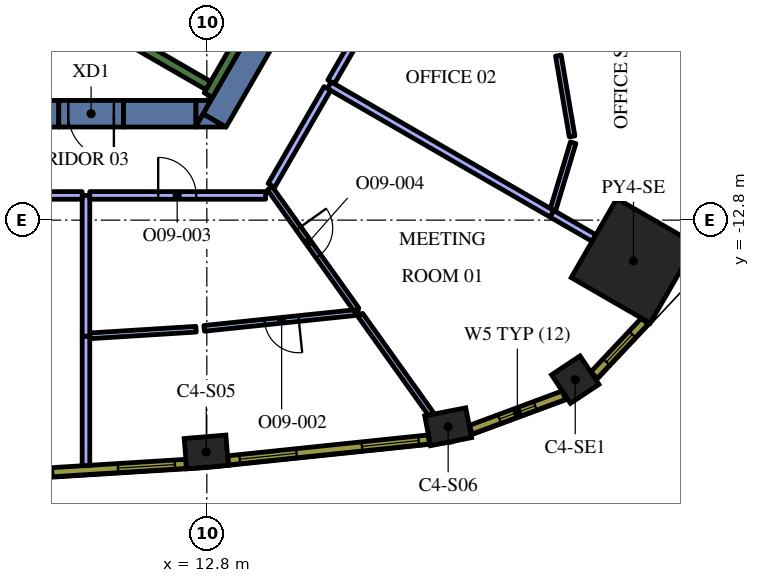
"""IFC4 building model, lengths in metres.
Left out: names, types, materials, properties, quantities, classifications, styles, units other than length and angle.
Written with IfcOpenShell. Run it as: python <this file> out.ifc"""

import sys

from ifc_helpers import new_model, si_unit, direction, frame, frame_2d, origin, origin_2d, place, context, subcontext, project, spatial, polyline, rectangle, outline, extrude, element, fill, save


model = new_model("IFC4")
c1 = context("Model", 3, precision=1e-05, world=origin(), true_north=direction((0.0, 1.0)))
c2 = subcontext(c1, "Body", "Model", "MODEL_VIEW")
j1 = project(units=[si_unit("LENGTHUNIT", "METRE"), si_unit("PLANEANGLEUNIT", "RADIAN")], contexts=[c1])
p1 = place(None, origin())
s1 = spatial("IfcSite", under=j1, at=p1, CompositionType="ELEMENT")
p2 = place(p1, origin())
s2 = spatial("IfcBuilding", under=s1, at=p2, CompositionType="ELEMENT")
p3 = place(p2, frame((0.0, 0.0, 239.4)))
s3 = spatial("IfcBuildingStorey", under=s2, at=p3, CompositionType="ELEMENT", Elevation=239.4)
p4 = place(p3, frame((24.027, -13.872, 0.0), z_axis=(0.0, 0.0, 1.0), x_axis=(0.866025403784, -0.5, 0.0)))
e1 = element("IfcColumn", 1, at=p4, inside=s3, PredefinedType="COLUMN", context=c2, shape_type="SweptSolid", body=[
    extrude(rectangle(XDim=2.4, YDim=2.4, at=origin_2d()), origin(), (0.0, 0.0, 1.0), 4.2),
])
for number, where, z_axis, x_axis in (
    (2, (12.785, -18.9, 0.0), (0.0, 0.0, 1.0), (0.997, 0.083, 0.0)),
    (3, (19.15, -18.237, 0.0), (0.0, 0.0, 1.0), (0.981, 0.192, 0.0)),
):
    element("IfcColumn", number, at=place(p3, frame(where, z_axis=z_axis, x_axis=x_axis)), inside=s3, PredefinedType="COLUMN", context=c2, shape_type="SweptSolid", body=[
        extrude(rectangle(XDim=1.1, YDim=0.8, at=origin_2d()), origin(), (0.0, 0.0, 1.0), 4.2),
    ])
p5 = place(p3, frame((22.494, -16.997, 0.0), z_axis=(0.0, 0.0, 1.0), x_axis=(0.833238868178, 0.552913183563, 0.0)))
e4 = element("IfcColumn", 4, at=p5, inside=s3, PredefinedType="COLUMN", context=c2, shape_type="SweptSolid", body=[
    extrude(rectangle(XDim=0.9, YDim=0.9, at=origin_2d()), origin(), (0.0, 0.0, 1.0), 4.2),
])
p6 = place(p3, frame((13.003, -10.179, 0.0), z_axis=(0.0, 0.0, 1.0), x_axis=(0.499972675833, 0.866041178825, 0.0)))
e5 = element("IfcWall", 5, at=p6, inside=s3, PredefinedType="SOLIDWALL", context=c2, shape_type="SweptSolid", body=[
    extrude(rectangle(XDim=3.829, YDim=0.7, at=frame_2d((1.915, 0.0))), origin(), (0.0, 0.0, 1.0), 4.2),
])
p7 = place(p3, origin())
e6 = element("IfcWall", 6, at=p7, inside=s3, PredefinedType="SOLIDWALL", context=c2, shape_type="SweptSolid", body=[
    extrude(outline(polyline([(12.5, -10.35), (12.698, -10.005), (13.296, -10.35), (12.5, -10.35)])), origin(), (0.0, 0.0, 1.0), 4.2),
])
p8 = place(p3, frame((10.604, -10.0, 0.0), z_axis=(0.0, 0.0, 1.0), x_axis=(1.0, 0.0, 0.0)))
e7 = element("IfcWall", 7, at=p8, inside=s3, PredefinedType="SOLIDWALL", context=c2, shape_type="SweptSolid", body=[
    extrude(rectangle(XDim=1.909, YDim=0.7, at=frame_2d((0.955, 0.0))), origin(), (0.0, 0.0, 1.0), 4.2),
])
e8 = element("IfcWall", 8, at=p7, inside=s3, PredefinedType="SOLIDWALL", context=c2, shape_type="SweptSolid", body=[
    extrude(outline(polyline([(12.904, -9.65), (12.516, -10.322), (12.516, -9.65), (12.904, -9.65)])), origin(), (0.0, 0.0, 1.0), 4.2),
])
p9 = place(p3, frame((8.904, -10.0, 0.0), z_axis=(0.0, 0.0, 1.0), x_axis=(-1.0, 0.0, 0.0)))
e9 = element("IfcWall", 9, at=p9, inside=s3, PredefinedType="SOLIDWALL", context=c2, shape_type="SweptSolid", body=[
    extrude(rectangle(XDim=22.226, YDim=0.7, at=frame_2d((11.113, 0.0))), origin(), (0.0, 0.0, 1.0), 4.2),
])
p10 = place(p3, frame((12.84, -9.511, 0.0), z_axis=(0.0, 0.0, 1.0), x_axis=(0.500048121057, 0.865997619297, 0.0)))
e10 = element("IfcWall", 10, at=p10, inside=s3, PredefinedType="SOLIDWALL", context=c2, shape_type="SweptSolid", body=[
    extrude(rectangle(XDim=3.634, YDim=0.25, at=frame_2d((1.817, 0.0))), origin(), (0.0, 0.0, 1.0), 4.2),
])
p11 = place(p3, frame((12.84, -9.261, 0.0), z_axis=(0.0, 0.0, 1.0), x_axis=(-0.866013990052, 0.500019768644, 0.0)))
e11 = element("IfcWall", 11, at=p11, inside=s3, PredefinedType="SOLIDWALL", context=c2, shape_type="SweptSolid", body=[
    extrude(rectangle(XDim=6.8, YDim=0.25, at=frame_2d((3.4, 0.0))), origin(), (0.0, 0.0, 1.0), 4.2),
])
p12 = place(p3, frame((10.604, -10.0, 0.0), z_axis=(0.0, 0.0, 1.0), x_axis=(-1.0, 0.0, 0.0)))
e12 = element("IfcWall", 12, at=p12, inside=s3, PredefinedType="SOLIDWALL", context=c2, shape_type="SweptSolid", body=[
    extrude(rectangle(XDim=1.7, YDim=0.7, at=frame_2d((0.85, 0.0))), origin(), (0.0, 0.0, 1.0), 4.2),
])
p13 = place(p12, frame((0.25, 0.0, 0.0)))
e13 = element("IfcOpeningElement", 13, at=p13, cuts=e12, PredefinedType="OPENING", context=c2, shape_type="SweptSolid", body=[
    extrude(rectangle(XDim=1.2, YDim=2.1, at=frame_2d((0.6, 1.05))), frame((0.0, 0.36, 0.0), z_axis=(0.0, -1.0, 0.0), x_axis=(1.0, 0.0, 0.0)), (0.0, 0.0, 1.0), 0.72),
])
p14 = place(p3, frame((9.62, -15.847, 0.0), z_axis=(0.0, 0.0, 1.0), x_axis=(0.0, -1.0, 0.0)))
e14 = element("IfcWall", 14, at=p14, inside=s3, PredefinedType="PARTITIONING", context=c2, shape_type="SweptSolid", body=[
    extrude(rectangle(XDim=3.411, YDim=0.2, at=frame_2d((1.705, 0.0))), origin(), (0.0, 0.0, 1.0), 3.45),
])
p15 = place(p3, frame((9.62, -12.15, 0.0), z_axis=(0.0, 0.0, 1.0), x_axis=(0.0, -1.0, 0.0)))
e15 = element("IfcWall", 15, at=p15, inside=s3, PredefinedType="PARTITIONING", context=c2, shape_type="SweptSolid", body=[
    extrude(rectangle(XDim=3.705, YDim=0.2, at=frame_2d((1.853, 0.0))), origin(), (0.0, 0.0, 1.0), 3.45),
])
p16 = place(p3, frame((7.03, -12.15, 0.0), z_axis=(0.0, 0.0, 1.0), x_axis=(1.0, 0.0, 0.0)))
e16 = element("IfcWall", 16, at=p16, inside=s3, PredefinedType="PARTITIONING", context=c2, shape_type="SweptSolid", body=[
    extrude(rectangle(XDim=2.49, YDim=0.2, at=frame_2d((1.245, 0.0))), origin(), (0.0, 0.0, 1.0), 3.45),
])
p17 = place(p3, frame((9.72, -15.844, 0.0), z_axis=(0.0, 0.0, 1.0), x_axis=(0.998063411199, 0.062204720286, 0.0)))
e17 = element("IfcWall", 17, at=p17, inside=s3, PredefinedType="PARTITIONING", context=c2, shape_type="SweptSolid", body=[
    extrude(rectangle(XDim=2.802, YDim=0.15, at=frame_2d((1.401, 0.0))), origin(), (0.0, 0.0, 1.0), 3.45),
])
p18 = place(p3, frame((16.788, -15.225, 0.0), z_axis=(0.0, 0.0, 1.0), x_axis=(-0.994622518406, -0.103566625322, 0.0)))
e18 = element("IfcWall", 18, at=p18, inside=s3, PredefinedType="PARTITIONING", context=c2, shape_type="SweptSolid", body=[
    extrude(rectangle(XDim=4.081, YDim=0.15, at=frame_2d((2.04, 0.0))), origin(), (0.0, 0.0, 1.0), 3.45),
])
p19 = place(p18, frame((1.581, 0.0, 0.0)))
e19 = element("IfcOpeningElement", 19, at=p19, cuts=e18, PredefinedType="OPENING", context=c2, shape_type="SweptSolid", body=[
    extrude(rectangle(XDim=0.9, YDim=2.1, at=frame_2d((0.45, 1.05))), frame((0.0, 0.085, 0.0), z_axis=(0.0, -1.0, 0.0), x_axis=(1.0, 0.0, 0.0)), (0.0, 0.0, 1.0), 0.17),
])
p20 = place(p3, frame((16.838, -15.295, 0.0), z_axis=(0.0, 0.0, 1.0), x_axis=(0.581015803238, -0.813892275666, 0.0)))
e20 = element("IfcWall", 20, at=p20, inside=s3, PredefinedType="PARTITIONING", context=c2, shape_type="SweptSolid", body=[
    extrude(rectangle(XDim=3.219, YDim=0.15, at=frame_2d((1.61, 0.0))), origin(), (0.0, 0.0, 1.0), 3.45),
])
p21 = place(p3, frame((14.457, -11.96, 0.0), z_axis=(0.0, 0.0, 1.0), x_axis=(0.581049944662, -0.81386790194, 0.0)))
e21 = element("IfcWall", 21, at=p21, inside=s3, PredefinedType="PARTITIONING", context=c2, shape_type="SweptSolid", body=[
    extrude(rectangle(XDim=3.926, YDim=0.15, at=frame_2d((1.963, 0.0))), origin(), (0.0, 0.0, 1.0), 3.45),
])
p22 = place(p21, frame((1.3, 0.0, 0.0)))
e22 = element("IfcOpeningElement", 22, at=p22, cuts=e21, PredefinedType="OPENING", context=c2, shape_type="SweptSolid", body=[
    extrude(rectangle(XDim=0.9, YDim=2.1, at=frame_2d((0.45, 1.05))), frame((0.0, 0.085, 0.0), z_axis=(0.0, -1.0, 0.0), x_axis=(1.0, 0.0, 0.0)), (0.0, 0.0, 1.0), 0.17),
])
p23 = place(p3, frame((9.72, -12.15, 0.0), z_axis=(0.0, 0.0, 1.0), x_axis=(1.0, 0.0, 0.0)))
e23 = element("IfcWall", 23, at=p23, inside=s3, PredefinedType="PARTITIONING", context=c2, shape_type="SweptSolid", body=[
    extrude(rectangle(XDim=4.627, YDim=0.2, at=frame_2d((2.314, 0.0))), origin(), (0.0, 0.0, 1.0), 3.45),
])
p24 = place(p23, frame((1.8, 0.0, 0.0)))
e24 = element("IfcOpeningElement", 24, at=p24, cuts=e23, PredefinedType="OPENING", context=c2, shape_type="SweptSolid", body=[
    extrude(rectangle(XDim=1.0, YDim=2.1, at=frame_2d((0.5, 1.05))), frame((0.0, 0.11, 0.0), z_axis=(0.0, -1.0, 0.0), x_axis=(1.0, 0.0, 0.0)), (0.0, 0.0, 1.0), 0.22),
])
p25 = place(p3, frame((21.873, -12.628, 0.0), z_axis=(0.0, 0.0, 1.0), x_axis=(0.866052988967, -0.499952218018, 0.0)))
e25 = element("IfcWall", 25, at=p25, inside=s3, PredefinedType="PARTITIONING", context=c2, shape_type="SweptSolid", body=[
    extrude(rectangle(XDim=1.288, YDim=0.2, at=frame_2d((0.644, 0.0))), origin(), (0.0, 0.0, 1.0), 3.45),
])
p26 = place(p3, frame((16.021, -9.25, 0.0), z_axis=(0.0, 0.0, 1.0), x_axis=(0.86602692059, -0.499997372806, 0.0)))
e26 = element("IfcWall", 26, at=p26, inside=s3, PredefinedType="PARTITIONING", context=c2, shape_type="SweptSolid", body=[
    extrude(rectangle(XDim=6.765, YDim=0.2, at=frame_2d((3.382, 0.0))), origin(), (0.0, 0.0, 1.0), 3.45),
])
p27 = place(p3, frame((14.498, -11.888, 0.0), z_axis=(0.0, 0.0, 1.0), x_axis=(0.500006981563, 0.86602137294, 0.0)))
e27 = element("IfcWall", 27, at=p27, inside=s3, PredefinedType="PARTITIONING", context=c2, shape_type="SweptSolid", body=[
    extrude(rectangle(XDim=2.946, YDim=0.2, at=frame_2d((1.473, 0.0))), origin(), (0.0, 0.0, 1.0), 3.45),
])
p28 = place(p3, frame((21.906, -12.532, 0.0), z_axis=(0.0, 0.0, 1.0), x_axis=(0.288789848591, 0.957392512688, 0.0)))
e28 = element("IfcWall", 28, at=p28, inside=s3, PredefinedType="PARTITIONING", context=c2, shape_type="SweptSolid", body=[
    extrude(rectangle(XDim=1.848, YDim=0.15, at=frame_2d((0.924, 0.0))), origin(), (0.0, 0.0, 1.0), 3.45),
])
p29 = place(p3, frame((22.412, -10.597, 0.0), z_axis=(0.0, 0.0, 1.0), x_axis=(-0.167612004459, 0.985853039738, 0.0)))
e29 = element("IfcWall", 29, at=p29, inside=s3, PredefinedType="PARTITIONING", context=c2, shape_type="SweptSolid", body=[
    extrude(rectangle(XDim=2.156, YDim=0.15, at=frame_2d((1.078, 0.0))), origin(), (0.0, 0.0, 1.0), 3.45),
])
p30 = place(p3, frame((16.072, -9.163, 0.0), z_axis=(0.0, 0.0, 1.0), x_axis=(0.500010870188, 0.866019127788, 0.0)))
e30 = element("IfcWall", 30, at=p30, inside=s3, PredefinedType="PARTITIONING", context=c2, shape_type="SweptSolid", body=[
    extrude(rectangle(XDim=3.249, YDim=0.2, at=frame_2d((1.624, 0.0))), origin(), (0.0, 0.0, 1.0), 3.45),
])
p31 = place(p3, frame((6.965, -19.543, 0.0), z_axis=(0.0, 0.0, 1.0), x_axis=(0.9980633213, 0.062206162685, 0.0)))
e31 = element("IfcWall", 31, at=p31, inside=s3, PredefinedType="SOLIDWALL", context=c2, shape_type="SweptSolid", body=[
    extrude(rectangle(XDim=5.298, YDim=0.24, at=frame_2d((2.649, 0.0))), origin(), (0.0, 0.0, 1.0), 3.95),
])
p32 = place(p31, frame((0.295, 0.0, 0.9)))
e32 = element("IfcOpeningElement", 32, at=p32, cuts=e31, PredefinedType="OPENING", context=c2, shape_type="SweptSolid", body=[
    extrude(rectangle(XDim=1.5, YDim=2.55, at=frame_2d((0.75, 1.275))), frame((0.0, 0.13, 0.0), z_axis=(0.0, -1.0, 0.0), x_axis=(1.0, 0.0, 0.0)), (0.0, 0.0, 1.0), 0.26),
])
p33 = place(p31, frame((3.504, 0.0, 0.9)))
e33 = element("IfcOpeningElement", 33, at=p33, cuts=e31, PredefinedType="OPENING", context=c2, shape_type="SweptSolid", body=[
    extrude(rectangle(XDim=1.5, YDim=2.55, at=frame_2d((0.75, 1.275))), frame((0.0, 0.13, 0.0), z_axis=(0.0, -1.0, 0.0), x_axis=(1.0, 0.0, 0.0)), (0.0, 0.0, 1.0), 0.26),
])
p34 = place(p3, frame((13.362, -19.121, 0.0), z_axis=(0.0, 0.0, 1.0), x_axis=(0.994621961215, 0.103571976272, 0.0)))
e34 = element("IfcWall", 34, at=p34, inside=s3, PredefinedType="SOLIDWALL", context=c2, shape_type="SweptSolid", body=[
    extrude(rectangle(XDim=5.311, YDim=0.24, at=frame_2d((2.655, 0.0))), origin(), (0.0, 0.0, 1.0), 3.95),
])
p35 = place(p34, frame((0.306, 0.0, 0.9)))
e35 = element("IfcOpeningElement", 35, at=p35, cuts=e34, PredefinedType="OPENING", context=c2, shape_type="SweptSolid", body=[
    extrude(rectangle(XDim=1.5, YDim=2.55, at=frame_2d((0.75, 1.275))), frame((0.0, 0.13, 0.0), z_axis=(0.0, -1.0, 0.0), x_axis=(1.0, 0.0, 0.0)), (0.0, 0.0, 1.0), 0.26),
])
p36 = place(p34, frame((3.539, 0.0, 0.9)))
e36 = element("IfcOpeningElement", 36, at=p36, cuts=e34, PredefinedType="OPENING", context=c2, shape_type="SweptSolid", body=[
    extrude(rectangle(XDim=1.5, YDim=2.55, at=frame_2d((0.75, 1.275))), frame((0.0, 0.13, 0.0), z_axis=(0.0, -1.0, 0.0), x_axis=(1.0, 0.0, 0.0)), (0.0, 0.0, 1.0), 0.26),
])
p37 = place(p3, frame((19.748, -18.314, 0.0), z_axis=(0.0, 0.0, 1.0), x_axis=(0.937569171184, 0.347798863203, 0.0)))
e37 = element("IfcWall", 37, at=p37, inside=s3, PredefinedType="SOLIDWALL", context=c2, shape_type="SweptSolid", body=[
    extrude(rectangle(XDim=2.609, YDim=0.24, at=frame_2d((1.305, 0.0))), origin(), (0.0, 0.0, 1.0), 3.95),
])
p38 = place(p37, frame((0.805, 0.0, 0.9)))
e38 = element("IfcOpeningElement", 38, at=p38, cuts=e37, PredefinedType="OPENING", context=c2, shape_type="SweptSolid", body=[
    extrude(rectangle(XDim=1.0, YDim=2.55, at=frame_2d((0.5, 1.275))), frame((0.0, 0.13, 0.0), z_axis=(0.0, -1.0, 0.0), x_axis=(1.0, 0.0, 0.0)), (0.0, 0.0, 1.0), 0.26),
])
p39 = place(p3, frame((22.989, -16.879, 0.0), z_axis=(0.0, 0.0, 1.0), x_axis=(0.684770274166, 0.728758994194, 0.0)))
e39 = element("IfcWall", 39, at=p39, inside=s3, PredefinedType="SOLIDWALL", context=c2, shape_type="SweptSolid", body=[
    extrude(rectangle(XDim=1.948, YDim=0.24, at=frame_2d((0.974, 0.0))), origin(), (0.0, 0.0, 1.0), 3.95),
])
p40 = place(p39, frame((0.474, 0.0, 0.9)))
e40 = element("IfcOpeningElement", 40, at=p40, cuts=e39, PredefinedType="OPENING", context=c2, shape_type="SweptSolid", body=[
    extrude(rectangle(XDim=1.0, YDim=2.55, at=frame_2d((0.5, 1.275))), frame((0.0, 0.13, 0.0), z_axis=(0.0, -1.0, 0.0), x_axis=(1.0, 0.0, 0.0)), (0.0, 0.0, 1.0), 0.26),
])
p41 = place(p13, origin())
e41 = element("IfcDoor", 41, at=p41, inside=s3, OperationType="SINGLE_SWING_LEFT", PredefinedType="DOOR", context=c2, shape_type="SweptSolid", body=[
    extrude(rectangle(XDim=1.2, YDim=2.1, at=frame_2d((0.6, 1.05))), frame((0.0, 0.025, 0.0), z_axis=(0.0, -1.0, 0.0), x_axis=(1.0, 0.0, 0.0)), (0.0, 0.0, 1.0), 0.05),
])
fill(e13, e41)
p42 = place(p19, origin())
e42 = element("IfcDoor", 42, at=p42, inside=s3, OperationType="SINGLE_SWING_LEFT", PredefinedType="DOOR", context=c2, shape_type="SweptSolid", body=[
    extrude(rectangle(XDim=0.9, YDim=2.1, at=frame_2d((0.45, 1.05))), frame((0.0, 0.025, 0.0), z_axis=(0.0, -1.0, 0.0), x_axis=(1.0, 0.0, 0.0)), (0.0, 0.0, 1.0), 0.05),
])
fill(e19, e42)
p43 = place(p24, origin())
e43 = element("IfcDoor", 43, at=p43, inside=s3, OperationType="SINGLE_SWING_LEFT", PredefinedType="DOOR", context=c2, shape_type="SweptSolid", body=[
    extrude(rectangle(XDim=1.0, YDim=2.1, at=frame_2d((0.5, 1.05))), frame((0.0, 0.025, 0.0), z_axis=(0.0, -1.0, 0.0), x_axis=(1.0, 0.0, 0.0)), (0.0, 0.0, 1.0), 0.05),
])
fill(e24, e43)
p44 = place(p22, origin())
e44 = element("IfcDoor", 44, at=p44, inside=s3, OperationType="SINGLE_SWING_LEFT", PredefinedType="DOOR", context=c2, shape_type="SweptSolid", body=[
    extrude(rectangle(XDim=0.9, YDim=2.1, at=frame_2d((0.45, 1.05))), frame((0.0, 0.025, 0.0), z_axis=(0.0, -1.0, 0.0), x_axis=(1.0, 0.0, 0.0)), (0.0, 0.0, 1.0), 0.05),
])
fill(e22, e44)
p45 = place(p32, origin())
e45 = element("IfcWindow", 45, at=p45, inside=s3, PartitioningType="SINGLE_PANEL", PredefinedType="WINDOW", context=c2, shape_type="SweptSolid", body=[
    extrude(rectangle(XDim=1.5, YDim=2.55, at=frame_2d((0.75, 1.275))), frame((0.0, 0.04, 0.0), z_axis=(0.0, -1.0, 0.0), x_axis=(1.0, 0.0, 0.0)), (0.0, 0.0, 1.0), 0.06),
])
fill(e32, e45)
p46 = place(p33, origin())
e46 = element("IfcWindow", 46, at=p46, inside=s3, PartitioningType="SINGLE_PANEL", PredefinedType="WINDOW", context=c2, shape_type="SweptSolid", body=[
    extrude(rectangle(XDim=1.5, YDim=2.55, at=frame_2d((0.75, 1.275))), frame((0.0, 0.04, 0.0), z_axis=(0.0, -1.0, 0.0), x_axis=(1.0, 0.0, 0.0)), (0.0, 0.0, 1.0), 0.06),
])
fill(e33, e46)
p47 = place(p35, origin())
e47 = element("IfcWindow", 47, at=p47, inside=s3, PartitioningType="SINGLE_PANEL", PredefinedType="WINDOW", context=c2, shape_type="SweptSolid", body=[
    extrude(rectangle(XDim=1.5, YDim=2.55, at=frame_2d((0.75, 1.275))), frame((0.0, 0.04, 0.0), z_axis=(0.0, -1.0, 0.0), x_axis=(1.0, 0.0, 0.0)), (0.0, 0.0, 1.0), 0.06),
])
fill(e35, e47)
p48 = place(p36, origin())
e48 = element("IfcWindow", 48, at=p48, inside=s3, PartitioningType="SINGLE_PANEL", PredefinedType="WINDOW", context=c2, shape_type="SweptSolid", body=[
    extrude(rectangle(XDim=1.5, YDim=2.55, at=frame_2d((0.75, 1.275))), frame((0.0, 0.04, 0.0), z_axis=(0.0, -1.0, 0.0), x_axis=(1.0, 0.0, 0.0)), (0.0, 0.0, 1.0), 0.06),
])
fill(e36, e48)
p49 = place(p38, origin())
e49 = element("IfcWindow", 49, at=p49, inside=s3, PartitioningType="SINGLE_PANEL", PredefinedType="WINDOW", context=c2, shape_type="SweptSolid", body=[
    extrude(rectangle(XDim=1.0, YDim=2.55, at=frame_2d((0.5, 1.275))), frame((0.0, 0.04, 0.0), z_axis=(0.0, -1.0, 0.0), x_axis=(1.0, 0.0, 0.0)), (0.0, 0.0, 1.0), 0.06),
])
fill(e38, e49)
p50 = place(p40, origin())
e50 = element("IfcWindow", 50, at=p50, inside=s3, PartitioningType="SINGLE_PANEL", PredefinedType="WINDOW", context=c2, shape_type="SweptSolid", body=[
    extrude(rectangle(XDim=1.0, YDim=2.55, at=frame_2d((0.5, 1.275))), frame((0.0, 0.04, 0.0), z_axis=(0.0, -1.0, 0.0), x_axis=(1.0, 0.0, 0.0)), (0.0, 0.0, 1.0), 0.06),
])
fill(e40, e50)
save(model, sys.argv[1])
